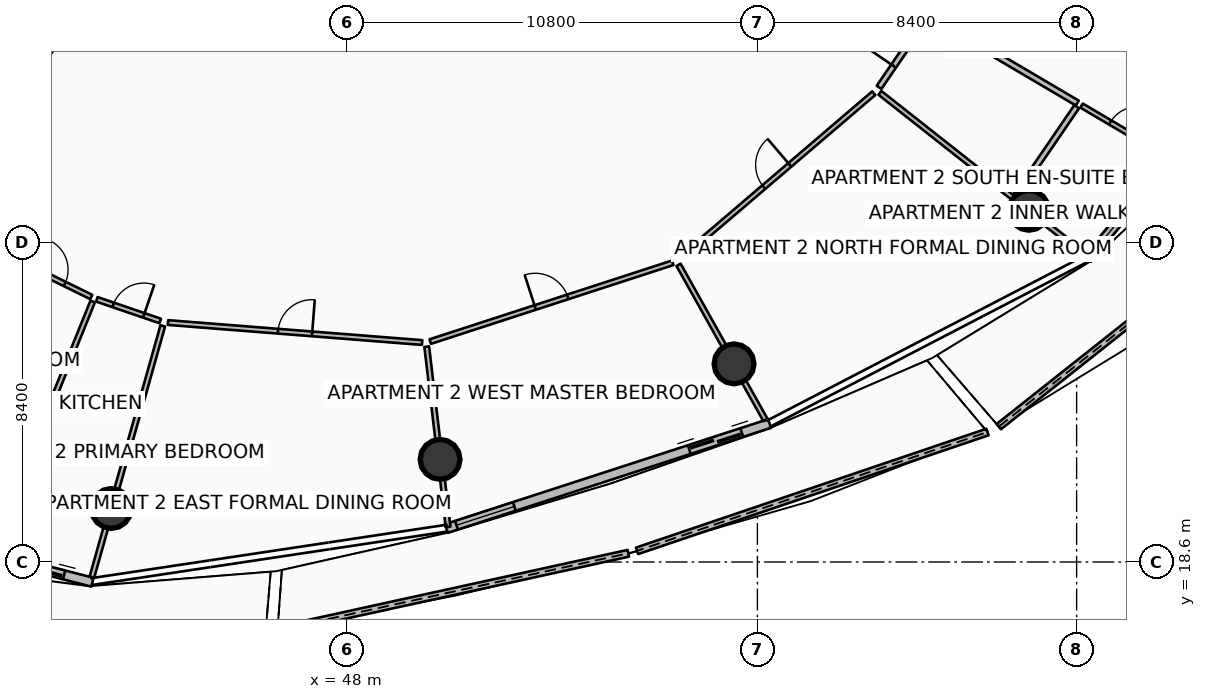
"""IFC4 building model, lengths in metres.
Left out: names, types, materials, properties, quantities, classifications, styles, units other than length and angle.
Written with IfcOpenShell. Run it as: python <this file> out.ifc"""

import sys

from ifc_helpers import new_model, si_unit, direction, frame, frame_2d, origin, origin_2d, place, context, subcontext, project, spatial, polyline, rectangle, circle, outline, extrude, element, fill, save


model = new_model("IFC4")
c1 = context("Model", 3, precision=1e-05, world=origin(), true_north=direction((0.0, 1.0)))
c2 = subcontext(c1, "Body", "Model", "MODEL_VIEW")
j1 = project(units=[si_unit("LENGTHUNIT", "METRE"), si_unit("PLANEANGLEUNIT", "RADIAN")], contexts=[c1])
p1 = place(None, origin())
s1 = spatial("IfcSite", under=j1, at=p1, CompositionType="ELEMENT")
p2 = place(p1, origin())
s2 = spatial("IfcBuilding", under=s1, at=p2, CompositionType="ELEMENT")
p3 = place(p2, frame((0.0, 0.0, 217.8)))
s3 = spatial("IfcBuildingStorey", under=s2, at=p3, CompositionType="ELEMENT", Elevation=217.8)
for number, where, z_axis, x_axis in (
    (1, (41.798, 20.008, 0.0), (0.0, 0.0, 1.0), (1.0, 0.0, 0.0)),
    (2, (50.45, 21.3, 0.0), (0.0, 0.0, 1.0), (1.0, 0.0, 0.0)),
    (3, (58.185, 23.814, 0.0), (0.0, 0.0, 1.0), (1.0, 0.0, 0.0)),
    (4, (65.944, 27.854, 0.0), (0.0, 0.0, 1.0), (1.0, 0.0, 0.0)),
):
    element("IfcColumn", number, at=place(p3, frame(where, z_axis=z_axis, x_axis=x_axis)), inside=s3, PredefinedType="COLUMN", context=c2, shape_type="SweptSolid", body=[
        extrude(circle(Radius=0.525, at=origin_2d()), origin(), (0.0, 0.0, 1.0), 3.5),
    ])
p4 = place(p3, frame((46.172, 16.807, 0.0), z_axis=(0.0, 0.0, 1.0), x_axis=(0.976834914213, 0.213994276499, 0.0)))
e5 = element("IfcWall", 5, at=p4, inside=s3, PredefinedType="PARAPET", context=c2, shape_type="SweptSolid", body=[
    extrude(outline(polyline([(0.0, 0.0), (9.45, 0.0), (9.45, 1.348), (4.725, 1.182), (0.0, 1.12), (0.0, 0.0)])), frame((0.0, 0.09, 0.0), z_axis=(0.0, -1.0, 0.0), x_axis=(1.0, 0.0, 0.0)), (0.0, 0.0, 1.0), 0.18),
])
p5 = place(p3, frame((55.634, 18.894, 0.0), z_axis=(0.0, 0.0, 1.0), x_axis=(0.947048433124, 0.32109074312, 0.0)))
e6 = element("IfcWall", 6, at=p5, inside=s3, PredefinedType="PARAPET", context=c2, shape_type="SweptSolid", body=[
    extrude(outline(polyline([(0.0, 0.0), (9.736, 0.0), (9.736, 1.747), (4.868, 1.562), (0.0, 1.348), (0.0, 0.0)])), frame((0.0, 0.09, 0.0), z_axis=(0.0, -1.0, 0.0), x_axis=(1.0, 0.0, 0.0)), (0.0, 0.0, 1.0), 0.18),
])
p6 = place(p3, frame((65.153, 22.163, 0.0), z_axis=(0.0, 0.0, 1.0), x_axis=(0.783919701346, 0.620862224524, 0.0)))
e7 = element("IfcWall", 7, at=p6, inside=s3, PredefinedType="PARAPET", context=c2, shape_type="SweptSolid", body=[
    extrude(outline(polyline([(0.0, 0.0), (10.756, 0.0), (10.756, 1.832), (5.378, 1.853), (0.0, 1.756), (0.0, 0.0)])), frame((0.0, 0.09, 0.0), z_axis=(0.0, -1.0, 0.0), x_axis=(1.0, 0.0, 0.0)), (0.0, 0.0, 1.0), 0.18),
])
p7 = place(p3, frame((31.14, 20.687, 0.0), z_axis=(0.0, 0.0, 1.0), x_axis=(0.968374028006, -0.249502989727, 0.0)))
e8 = element("IfcWall", 8, at=p7, inside=s3, PredefinedType="SOLIDWALL", context=c2, shape_type="SweptSolid", body=[
    extrude(rectangle(XDim=10.494, YDim=0.24, at=frame_2d((5.247, 0.0))), origin(), (0.0, 0.0, 1.0), 2.45),
])
p8 = place(p7, frame((8.274, 0.0, 0.0)))
e9 = element("IfcOpeningElement", 9, at=p8, cuts=e8, PredefinedType="OPENING", context=c2, shape_type="SweptSolid", body=[
    extrude(rectangle(XDim=1.45, YDim=2.15, at=frame_2d((0.725, 1.075))), frame((0.0, 0.13, 0.0), z_axis=(0.0, -1.0, 0.0), x_axis=(1.0, 0.0, 0.0)), (0.0, 0.0, 1.0), 0.26),
])
p9 = place(p7, frame((0.28, 0.0, 0.65)))
e10 = element("IfcOpeningElement", 10, at=p9, cuts=e8, PredefinedType="OPENING", context=c2, shape_type="SweptSolid", body=[
    extrude(rectangle(XDim=1.6, YDim=1.5, at=frame_2d((0.8, 0.75))), frame((0.0, 0.13, 0.0), z_axis=(0.0, -1.0, 0.0), x_axis=(1.0, 0.0, 0.0)), (0.0, 0.0, 1.0), 0.26),
])
p10 = place(p3, frame((50.616, 19.481, 0.0), z_axis=(0.0, 0.0, 1.0), x_axis=(0.951058543936, 0.309010753869, 0.0)))
e11 = element("IfcWall", 11, at=p10, inside=s3, PredefinedType="SOLIDWALL", context=c2, shape_type="SweptSolid", body=[
    extrude(rectangle(XDim=8.942, YDim=0.24, at=frame_2d((4.471, 0.0))), origin(), (0.0, 0.0, 1.0), 2.45),
])
p11 = place(p10, frame((6.722, 0.0, 0.0)))
e12 = element("IfcOpeningElement", 12, at=p11, cuts=e11, PredefinedType="OPENING", context=c2, shape_type="SweptSolid", body=[
    extrude(rectangle(XDim=1.45, YDim=2.15, at=frame_2d((0.725, 1.075))), frame((0.0, 0.13, 0.0), z_axis=(0.0, -1.0, 0.0), x_axis=(1.0, 0.0, 0.0)), (0.0, 0.0, 1.0), 0.26),
])
p12 = place(p10, frame((0.28, 0.0, 0.65)))
e13 = element("IfcOpeningElement", 13, at=p12, cuts=e11, PredefinedType="OPENING", context=c2, shape_type="SweptSolid", body=[
    extrude(rectangle(XDim=1.6, YDim=1.5, at=frame_2d((0.8, 0.75))), frame((0.0, 0.13, 0.0), z_axis=(0.0, -1.0, 0.0), x_axis=(1.0, 0.0, 0.0)), (0.0, 0.0, 1.0), 0.26),
])
p13 = place(p3, frame((67.485, 26.576, 0.0), z_axis=(0.0, 0.0, 1.0), x_axis=(0.636759394418, 0.771062561418, 0.0)))
e14 = element("IfcWall", 14, at=p13, inside=s3, PredefinedType="SOLIDWALL", context=c2, shape_type="SweptSolid", body=[
    extrude(rectangle(XDim=10.494, YDim=0.24, at=frame_2d((5.247, 0.0))), origin(), (0.0, 0.0, 1.0), 2.45),
])
p14 = place(p13, frame((8.274, 0.0, 0.0)))
e15 = element("IfcOpeningElement", 15, at=p14, cuts=e14, PredefinedType="OPENING", context=c2, shape_type="SweptSolid", body=[
    extrude(rectangle(XDim=1.45, YDim=2.15, at=frame_2d((0.725, 1.075))), frame((0.0, 0.13, 0.0), z_axis=(0.0, -1.0, 0.0), x_axis=(1.0, 0.0, 0.0)), (0.0, 0.0, 1.0), 0.26),
])
p15 = place(p13, frame((0.28, 0.0, 0.65)))
e16 = element("IfcOpeningElement", 16, at=p15, cuts=e14, PredefinedType="OPENING", context=c2, shape_type="SweptSolid", body=[
    extrude(rectangle(XDim=1.6, YDim=1.5, at=frame_2d((0.8, 0.75))), frame((0.0, 0.13, 0.0), z_axis=(0.0, -1.0, 0.0), x_axis=(1.0, 0.0, 0.0)), (0.0, 0.0, 1.0), 0.26),
])
p16 = place(p3, frame((41.113, 33.264, 0.0), z_axis=(0.0, 0.0, 1.0), x_axis=(-0.619089233189, -0.785320648748, 0.0)))
e17 = element("IfcWall", 17, at=p16, inside=s3, PredefinedType="PARTITIONING", context=c2, shape_type="SweptSolid", body=[
    extrude(rectangle(XDim=16.006, YDim=0.18, at=frame_2d((8.003, 0.0))), origin(), (0.0, 0.0, 1.0), 2.94),
])
p17 = place(p3, frame((41.309, 25.455, 0.0), z_axis=(0.0, 0.0, 1.0), x_axis=(-0.374907525365, -0.927062213352, 0.0)))
e18 = element("IfcWall", 18, at=p17, inside=s3, PredefinedType="PARTITIONING", context=c2, shape_type="SweptSolid", body=[
    extrude(rectangle(XDim=7.092, YDim=0.125, at=frame_2d((3.546, 0.0))), origin(), (0.0, 0.0, 1.0), 2.94),
])
p18 = place(p3, frame((39.114, 26.634, 0.0), z_axis=(0.0, 0.0, 1.0), x_axis=(0.897413929061, -0.441189573683, 0.0)))
e19 = element("IfcWall", 19, at=p18, inside=s3, PredefinedType="PARTITIONING", context=c2, shape_type="SweptSolid", body=[
    extrude(rectangle(XDim=2.403, YDim=0.125, at=frame_2d((1.202, 0.0))), origin(), (0.0, 0.0, 1.0), 2.94),
])
p19 = place(p18, frame((0.777, 0.0, 0.0)))
e20 = element("IfcOpeningElement", 20, at=p19, cuts=e19, PredefinedType="OPENING", context=c2, shape_type="SweptSolid", body=[
    extrude(rectangle(XDim=0.85, YDim=2.06, at=frame_2d((0.425, 1.03))), frame((0.0, 0.073, 0.0), z_axis=(0.0, -1.0, 0.0), x_axis=(1.0, 0.0, 0.0)), (0.0, 0.0, 1.0), 0.145),
])
p20 = place(p3, frame((41.418, 25.512, 0.0), z_axis=(0.0, 0.0, 1.0), x_axis=(0.946216458122, -0.32353425534, 0.0)))
e21 = element("IfcWall", 21, at=p20, inside=s3, PredefinedType="PARTITIONING", context=c2, shape_type="SweptSolid", body=[
    extrude(rectangle(XDim=1.762, YDim=0.125, at=frame_2d((0.881, 0.0))), origin(), (0.0, 0.0, 1.0), 2.94),
])
p21 = place(p20, frame((0.456, 0.0, 0.0)))
e22 = element("IfcOpeningElement", 22, at=p21, cuts=e21, PredefinedType="OPENING", context=c2, shape_type="SweptSolid", body=[
    extrude(rectangle(XDim=0.85, YDim=2.06, at=frame_2d((0.425, 1.03))), frame((0.0, 0.073, 0.0), z_axis=(0.0, -1.0, 0.0), x_axis=(1.0, 0.0, 0.0)), (0.0, 0.0, 1.0), 0.145),
])
p22 = place(p3, frame((43.153, 24.813, 0.0), z_axis=(0.0, 0.0, 1.0), x_axis=(-0.271433998897, -0.962457055791, 0.0)))
e23 = element("IfcWall", 23, at=p22, inside=s3, PredefinedType="PARTITIONING", context=c2, shape_type="SweptSolid", body=[
    extrude(rectangle(XDim=6.87, YDim=0.125, at=frame_2d((3.435, 0.0))), origin(), (0.0, 0.0, 1.0), 2.94),
])
p23 = place(p3, frame((43.29, 24.901, 0.0), z_axis=(0.0, 0.0, 1.0), x_axis=(0.996916756268, -0.078466432773, 0.0)))
e24 = element("IfcWall", 24, at=p23, inside=s3, PredefinedType="PARTITIONING", context=c2, shape_type="SweptSolid", body=[
    extrude(rectangle(XDim=6.708, YDim=0.125, at=frame_2d((3.354, 0.0))), origin(), (0.0, 0.0, 1.0), 2.94),
])
p24 = place(p23, frame((2.904, 0.0, 0.0)))
e25 = element("IfcOpeningElement", 25, at=p24, cuts=e24, PredefinedType="OPENING", context=c2, shape_type="SweptSolid", body=[
    extrude(rectangle(XDim=0.9, YDim=2.08, at=frame_2d((0.45, 1.04))), frame((0.0, 0.073, 0.0), z_axis=(0.0, -1.0, 0.0), x_axis=(1.0, 0.0, 0.0)), (0.0, 0.0, 1.0), 0.145),
])
p25 = place(p3, frame((50.099, 24.267, 0.0), z_axis=(0.0, 0.0, 1.0), x_axis=(0.117511168915, -0.993071560956, 0.0)))
e26 = element("IfcWall", 26, at=p25, inside=s3, PredefinedType="PARTITIONING", context=c2, shape_type="SweptSolid", body=[
    extrude(rectangle(XDim=4.779, YDim=0.125, at=frame_2d((2.389, 0.0))), origin(), (0.0, 0.0, 1.0), 2.94),
])
p26 = place(p3, frame((50.192, 24.4, 0.0), z_axis=(0.0, 0.0, 1.0), x_axis=(0.951057868445, 0.309012832854, 0.0)))
e27 = element("IfcWall", 27, at=p26, inside=s3, PredefinedType="PARTITIONING", context=c2, shape_type="SweptSolid", body=[
    extrude(rectangle(XDim=6.708, YDim=0.125, at=frame_2d((3.354, 0.0))), origin(), (0.0, 0.0, 1.0), 2.94),
])
p27 = place(p26, frame((2.904, 0.0, 0.0)))
e28 = element("IfcOpeningElement", 28, at=p27, cuts=e27, PredefinedType="OPENING", context=c2, shape_type="SweptSolid", body=[
    extrude(rectangle(XDim=0.9, YDim=2.08, at=frame_2d((0.45, 1.04))), frame((0.0, 0.073, 0.0), z_axis=(0.0, -1.0, 0.0), x_axis=(1.0, 0.0, 0.0)), (0.0, 0.0, 1.0), 0.145),
])
p28 = place(p3, frame((56.725, 26.42, 0.0), z_axis=(0.0, 0.0, 1.0), x_axis=(0.488595423778, -0.872510465189, 0.0)))
e29 = element("IfcWall", 29, at=p28, inside=s3, PredefinedType="PARTITIONING", context=c2, shape_type="SweptSolid", body=[
    extrude(rectangle(XDim=4.678, YDim=0.125, at=frame_2d((2.339, 0.0))), origin(), (0.0, 0.0, 1.0), 2.94),
])
p29 = place(p3, frame((56.76, 26.579, 0.0), z_axis=(0.0, 0.0, 1.0), x_axis=(0.760424223761, 0.649426670161, 0.0)))
e30 = element("IfcWall", 30, at=p29, inside=s3, PredefinedType="PARTITIONING", context=c2, shape_type="SweptSolid", body=[
    extrude(rectangle(XDim=6.708, YDim=0.125, at=frame_2d((3.354, 0.0))), origin(), (0.0, 0.0, 1.0), 2.94),
])
p30 = place(p29, frame((2.904, 0.0, 0.0)))
e31 = element("IfcOpeningElement", 31, at=p30, cuts=e30, PredefinedType="OPENING", context=c2, shape_type="SweptSolid", body=[
    extrude(rectangle(XDim=0.9, YDim=2.08, at=frame_2d((0.45, 1.04))), frame((0.0, 0.073, 0.0), z_axis=(0.0, -1.0, 0.0), x_axis=(1.0, 0.0, 0.0)), (0.0, 0.0, 1.0), 0.145),
])
p31 = place(p3, frame((62.023, 30.945, 0.0), z_axis=(0.0, 0.0, 1.0), x_axis=(0.785321889756, -0.619087658955, 0.0)))
e32 = element("IfcWall", 32, at=p31, inside=s3, PredefinedType="PARTITIONING", context=c2, shape_type="SweptSolid", body=[
    extrude(rectangle(XDim=6.97, YDim=0.125, at=frame_2d((3.485, 0.0))), origin(), (0.0, 0.0, 1.0), 2.94),
])
p32 = place(p3, frame((62.001, 31.089, 0.0), z_axis=(0.0, 0.0, 1.0), x_axis=(0.564616496688, 0.825353385931, 0.0)))
e33 = element("IfcWall", 33, at=p32, inside=s3, PredefinedType="PARTITIONING", context=c2, shape_type="SweptSolid", body=[
    extrude(rectangle(XDim=2.207, YDim=0.15, at=frame_2d((1.104, 0.0))), origin(), (0.0, 0.0, 1.0), 2.94),
])
p33 = place(p32, frame((0.678, 0.0, 0.0)))
e34 = element("IfcOpeningElement", 34, at=p33, cuts=e33, PredefinedType="OPENING", context=c2, shape_type="SweptSolid", body=[
    extrude(rectangle(XDim=0.85, YDim=2.06, at=frame_2d((0.425, 1.03))), frame((0.0, 0.085, 0.0), z_axis=(0.0, -1.0, 0.0), x_axis=(1.0, 0.0, 0.0)), (0.0, 0.0, 1.0), 0.17),
])
p34 = place(p3, frame((65.606, 28.248, 0.0), z_axis=(0.0, 0.0, 1.0), x_axis=(0.564646756592, 0.825332684601, 0.0)))
e35 = element("IfcWall", 35, at=p34, inside=s3, PredefinedType="PARTITIONING", context=c2, shape_type="SweptSolid", body=[
    extrude(rectangle(XDim=2.826, YDim=0.15, at=frame_2d((1.413, 0.0))), origin(), (0.0, 0.0, 1.0), 2.94),
])
p35 = place(p3, frame((63.376, 32.939, 0.0), z_axis=(0.0, 0.0, 1.0), x_axis=(0.86154273728, -0.507685051819, 0.0)))
e36 = element("IfcWall", 36, at=p35, inside=s3, PredefinedType="PARTITIONING", context=c2, shape_type="SweptSolid", body=[
    extrude(rectangle(XDim=4.46, YDim=0.15, at=frame_2d((2.23, 0.0))), origin(), (0.0, 0.0, 1.0), 2.94),
])
p36 = place(p3, frame((67.33, 30.609, 0.0), z_axis=(0.0, 0.0, 1.0), x_axis=(0.861581059631, -0.507620013085, 0.0)))
e37 = element("IfcWall", 37, at=p36, inside=s3, PredefinedType="PARTITIONING", context=c2, shape_type="SweptSolid", body=[
    extrude(rectangle(XDim=2.596, YDim=0.125, at=frame_2d((1.298, 0.0))), origin(), (0.0, 0.0, 1.0), 2.94),
])
p37 = place(p36, frame((0.873, 0.0, 0.0)))
e38 = element("IfcOpeningElement", 38, at=p37, cuts=e37, PredefinedType="OPENING", context=c2, shape_type="SweptSolid", body=[
    extrude(rectangle(XDim=0.85, YDim=2.06, at=frame_2d((0.425, 1.03))), frame((0.0, 0.073, 0.0), z_axis=(0.0, -1.0, 0.0), x_axis=(1.0, 0.0, 0.0)), (0.0, 0.0, 1.0), 0.145),
])
p38 = place(p3, frame((64.412, 34.989, 0.0), z_axis=(0.0, 0.0, 1.0), x_axis=(0.919622074899, -0.392804327061, 0.0)))
e39 = element("IfcWall", 39, at=p38, inside=s3, PredefinedType="PARTITIONING", context=c2, shape_type="SweptSolid", body=[
    extrude(rectangle(XDim=7.93, YDim=0.125, at=frame_2d((3.965, 0.0))), origin(), (0.0, 0.0, 1.0), 2.94),
])
p39 = place(p8, origin())
e40 = element("IfcDoor", 40, at=p39, inside=s3, OperationType="DOUBLE_DOOR_SLIDING", PredefinedType="DOOR", context=c2, shape_type="SweptSolid", body=[
    extrude(rectangle(XDim=1.45, YDim=2.15, at=frame_2d((0.725, 1.075))), frame((0.0, 0.025, 0.0), z_axis=(0.0, -1.0, 0.0), x_axis=(1.0, 0.0, 0.0)), (0.0, 0.0, 1.0), 0.05),
])
fill(e9, e40)
p40 = place(p11, origin())
e41 = element("IfcDoor", 41, at=p40, inside=s3, OperationType="DOUBLE_DOOR_SLIDING", PredefinedType="DOOR", context=c2, shape_type="SweptSolid", body=[
    extrude(rectangle(XDim=1.45, YDim=2.15, at=frame_2d((0.725, 1.075))), frame((0.0, 0.025, 0.0), z_axis=(0.0, -1.0, 0.0), x_axis=(1.0, 0.0, 0.0)), (0.0, 0.0, 1.0), 0.05),
])
fill(e12, e41)
p41 = place(p12, origin())
e42 = element("IfcWindow", 42, at=p41, inside=s3, PartitioningType="SINGLE_PANEL", PredefinedType="WINDOW", context=c2, shape_type="SweptSolid", body=[
    extrude(rectangle(XDim=1.6, YDim=1.5, at=frame_2d((0.8, 0.75))), frame((0.0, 0.03, 0.0), z_axis=(0.0, -1.0, 0.0), x_axis=(1.0, 0.0, 0.0)), (0.0, 0.0, 1.0), 0.06),
])
fill(e13, e42)
p42 = place(p15, origin())
e43 = element("IfcWindow", 43, at=p42, inside=s3, PartitioningType="SINGLE_PANEL", PredefinedType="WINDOW", context=c2, shape_type="SweptSolid", body=[
    extrude(rectangle(XDim=1.6, YDim=1.5, at=frame_2d((0.8, 0.75))), frame((0.0, 0.03, 0.0), z_axis=(0.0, -1.0, 0.0), x_axis=(1.0, 0.0, 0.0)), (0.0, 0.0, 1.0), 0.06),
])
fill(e16, e43)
p43 = place(p19, origin())
e44 = element("IfcDoor", 44, at=p43, inside=s3, OperationType="SINGLE_SWING_LEFT", PredefinedType="DOOR", context=c2, shape_type="SweptSolid", body=[
    extrude(rectangle(XDim=0.85, YDim=2.06, at=frame_2d((0.425, 1.03))), frame((0.0, 0.025, 0.0), z_axis=(0.0, -1.0, 0.0), x_axis=(1.0, 0.0, 0.0)), (0.0, 0.0, 1.0), 0.05),
])
fill(e20, e44)
p44 = place(p21, origin())
e45 = element("IfcDoor", 45, at=p44, inside=s3, OperationType="SINGLE_SWING_RIGHT", PredefinedType="DOOR", context=c2, shape_type="SweptSolid", body=[
    extrude(rectangle(XDim=0.85, YDim=2.06, at=frame_2d((0.425, 1.03))), frame((0.0, 0.025, 0.0), z_axis=(0.0, -1.0, 0.0), x_axis=(1.0, 0.0, 0.0)), (0.0, 0.0, 1.0), 0.05),
])
fill(e22, e45)
p45 = place(p24, origin())
e46 = element("IfcDoor", 46, at=p45, inside=s3, OperationType="SINGLE_SWING_RIGHT", PredefinedType="DOOR", context=c2, shape_type="SweptSolid", body=[
    extrude(rectangle(XDim=0.9, YDim=2.08, at=frame_2d((0.45, 1.04))), frame((0.0, 0.025, 0.0), z_axis=(0.0, -1.0, 0.0), x_axis=(1.0, 0.0, 0.0)), (0.0, 0.0, 1.0), 0.05),
])
fill(e25, e46)
p46 = place(p27, origin())
e47 = element("IfcDoor", 47, at=p46, inside=s3, OperationType="SINGLE_SWING_LEFT", PredefinedType="DOOR", context=c2, shape_type="SweptSolid", body=[
    extrude(rectangle(XDim=0.9, YDim=2.08, at=frame_2d((0.45, 1.04))), frame((0.0, 0.025, 0.0), z_axis=(0.0, -1.0, 0.0), x_axis=(1.0, 0.0, 0.0)), (0.0, 0.0, 1.0), 0.05),
])
fill(e28, e47)
p47 = place(p30, origin())
e48 = element("IfcDoor", 48, at=p47, inside=s3, OperationType="SINGLE_SWING_RIGHT", PredefinedType="DOOR", context=c2, shape_type="SweptSolid", body=[
    extrude(rectangle(XDim=0.9, YDim=2.08, at=frame_2d((0.45, 1.04))), frame((0.0, 0.025, 0.0), z_axis=(0.0, -1.0, 0.0), x_axis=(1.0, 0.0, 0.0)), (0.0, 0.0, 1.0), 0.05),
])
fill(e31, e48)
p48 = place(p33, origin())
e49 = element("IfcDoor", 49, at=p48, inside=s3, OperationType="SINGLE_SWING_LEFT", PredefinedType="DOOR", context=c2, shape_type="SweptSolid", body=[
    extrude(rectangle(XDim=0.85, YDim=2.06, at=frame_2d((0.425, 1.03))), frame((0.0, 0.025, 0.0), z_axis=(0.0, -1.0, 0.0), x_axis=(1.0, 0.0, 0.0)), (0.0, 0.0, 1.0), 0.05),
])
fill(e34, e49)
p49 = place(p37, origin())
e50 = element("IfcDoor", 50, at=p49, inside=s3, OperationType="SINGLE_SWING_RIGHT", PredefinedType="DOOR", context=c2, shape_type="SweptSolid", body=[
    extrude(rectangle(XDim=0.85, YDim=2.06, at=frame_2d((0.425, 1.03))), frame((0.0, 0.025, 0.0), z_axis=(0.0, -1.0, 0.0), x_axis=(1.0, 0.0, 0.0)), (0.0, 0.0, 1.0), 0.05),
])
fill(e38, e50)
save(model, sys.argv[1])
